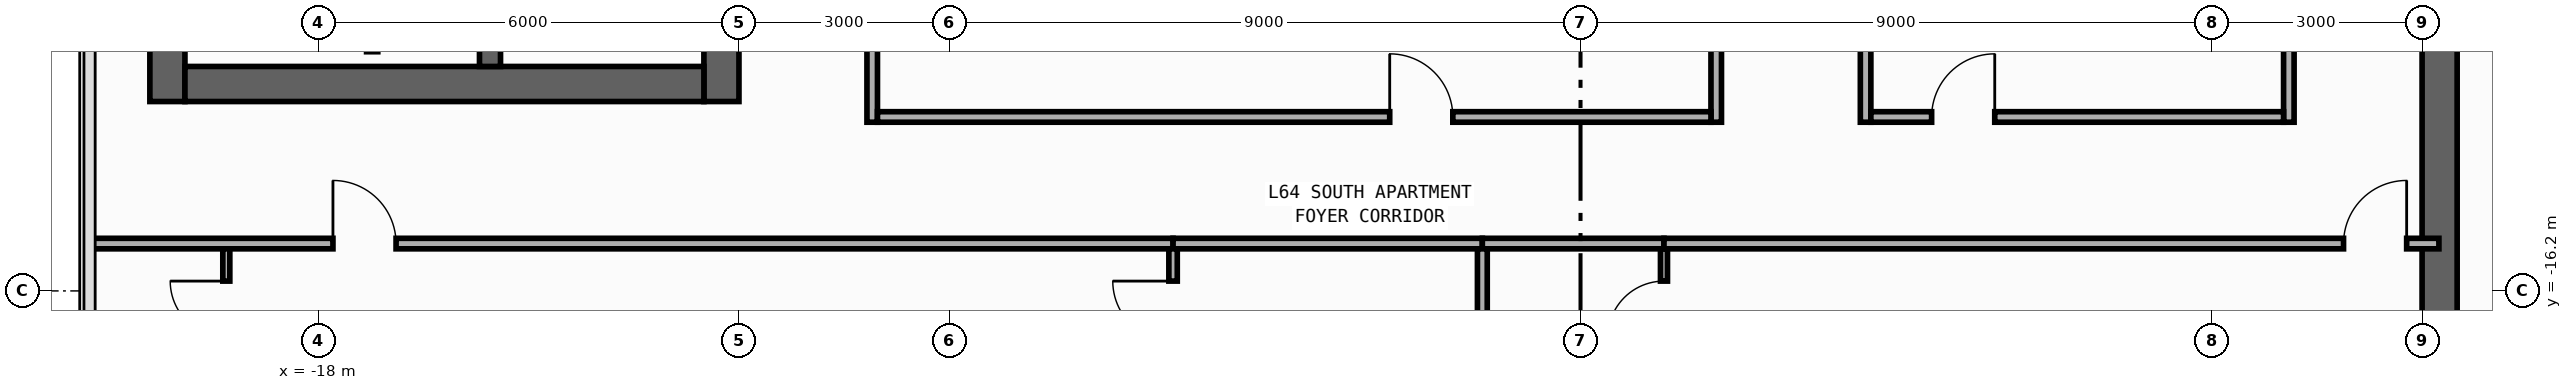
"""IFC4 building model, lengths in metres.
Left out: names, types, materials, properties, quantities, classifications, styles, units other than length and angle.
Written with IfcOpenShell. Run it as: python <this file> out.ifc"""

import sys

from ifc_helpers import new_model, si_unit, direction, frame, frame_2d, origin, place, context, subcontext, project, spatial, rectangle, extrude, element, fill, save


model = new_model("IFC4")
c1 = context("Model", 3, precision=1e-05, world=origin(), true_north=direction((0.0, 1.0)))
c2 = subcontext(c1, "Body", "Model", "MODEL_VIEW")
j1 = project(units=[si_unit("LENGTHUNIT", "METRE"), si_unit("PLANEANGLEUNIT", "RADIAN")], contexts=[c1])
p1 = place(None, origin())
s1 = spatial("IfcSite", under=j1, at=p1, CompositionType="ELEMENT")
p2 = place(p1, origin())
s2 = spatial("IfcBuilding", under=s1, at=p2, CompositionType="ELEMENT")
p3 = place(p2, frame((0.0, 0.0, 269.2)))
s3 = spatial("IfcBuildingStorey", under=s2, at=p3, CompositionType="ELEMENT", Elevation=269.2)
p4 = place(p3, frame((-20.15, -13.5, 0.0), z_axis=(0.0, 0.0, 1.0), x_axis=(0.0, 1.0, 0.0)))
e1 = element("IfcWall", 1, at=p4, inside=s3, PredefinedType="SHEAR", context=c2, shape_type="SweptSolid", body=[
    extrude(rectangle(XDim=27.0, YDim=0.5, at=frame_2d((13.5, 0.0))), origin(), (0.0, 0.0, 1.0), 3.25),
])
p5 = place(p3, frame((-12.25, -13.5, 0.0), z_axis=(0.0, 0.0, 1.0), x_axis=(0.0, 1.0, 0.0)))
e2 = element("IfcWall", 2, at=p5, inside=s3, PredefinedType="SHEAR", context=c2, shape_type="SweptSolid", body=[
    extrude(rectangle(XDim=27.0, YDim=0.5, at=frame_2d((13.5, 0.0))), origin(), (0.0, 0.0, 1.0), 3.25),
])
p6 = place(p5, frame((15.175, 0.0, 0.0)))
e3 = element("IfcOpeningElement", 3, at=p6, cuts=e2, PredefinedType="OPENING", context=c2, shape_type="SweptSolid", body=[
    extrude(rectangle(XDim=0.85, YDim=2.1, at=frame_2d((0.425, 1.05))), frame((0.0, 0.26, 0.0), z_axis=(0.0, -1.0, 0.0), x_axis=(1.0, 0.0, 0.0)), (0.0, 0.0, 1.0), 0.52),
])
p7 = place(p5, frame((21.275, 0.0, 0.0)))
e4 = element("IfcOpeningElement", 4, at=p7, cuts=e2, PredefinedType="OPENING", context=c2, shape_type="SweptSolid", body=[
    extrude(rectangle(XDim=0.85, YDim=2.1, at=frame_2d((0.425, 1.05))), frame((0.0, 0.26, 0.0), z_axis=(0.0, -1.0, 0.0), x_axis=(1.0, 0.0, 0.0)), (0.0, 0.0, 1.0), 0.52),
])
p8 = place(p5, frame((4.275, 0.0, 0.0)))
e5 = element("IfcOpeningElement", 5, at=p8, cuts=e2, PredefinedType="OPENING", context=c2, shape_type="SweptSolid", body=[
    extrude(rectangle(XDim=0.85, YDim=2.1, at=frame_2d((0.425, 1.05))), frame((0.0, 0.26, 0.0), z_axis=(0.0, -1.0, 0.0), x_axis=(1.0, 0.0, 0.0)), (0.0, 0.0, 1.0), 0.52),
])
p9 = place(p5, frame((10.275, 0.0, 0.0)))
e6 = element("IfcOpeningElement", 6, at=p9, cuts=e2, PredefinedType="OPENING", context=c2, shape_type="SweptSolid", body=[
    extrude(rectangle(XDim=0.85, YDim=2.1, at=frame_2d((0.425, 1.05))), frame((0.0, 0.26, 0.0), z_axis=(0.0, -1.0, 0.0), x_axis=(1.0, 0.0, 0.0)), (0.0, 0.0, 1.0), 0.52),
])
p10 = place(p5, frame((12.725, 0.0, 0.0)))
e7 = element("IfcOpeningElement", 7, at=p10, cuts=e2, PredefinedType="OPENING", context=c2, shape_type="SweptSolid", body=[
    extrude(rectangle(XDim=1.15, YDim=2.2, at=frame_2d((0.575, 1.1))), frame((0.0, 0.26, 0.0), z_axis=(0.0, -1.0, 0.0), x_axis=(1.0, 0.0, 0.0)), (0.0, 0.0, 1.0), 0.52),
])
p11 = place(p5, frame((1.625, 0.0, 0.0)))
e8 = element("IfcOpeningElement", 8, at=p11, cuts=e2, PredefinedType="OPENING", context=c2, shape_type="SweptSolid", body=[
    extrude(rectangle(XDim=0.85, YDim=2.1, at=frame_2d((0.425, 1.05))), frame((0.0, 0.26, 0.0), z_axis=(0.0, -1.0, 0.0), x_axis=(1.0, 0.0, 0.0)), (0.0, 0.0, 1.0), 0.52),
])
p12 = place(p3, frame((-19.9, -13.25, 0.0), z_axis=(0.0, 0.0, 1.0), x_axis=(1.0, 0.0, 0.0)))
e9 = element("IfcWall", 9, at=p12, inside=s3, PredefinedType="SHEAR", context=c2, shape_type="SweptSolid", body=[
    extrude(rectangle(XDim=7.4, YDim=0.5, at=frame_2d((3.7, 0.0))), origin(), (0.0, 0.0, 1.0), 3.25),
])
p13 = place(p3, frame((-15.55, -13.0, 0.0), z_axis=(0.0, 0.0, 1.0), x_axis=(0.0, 1.0, 0.0)))
e10 = element("IfcWall", 10, at=p13, inside=s3, PredefinedType="SHEAR", context=c2, shape_type="SweptSolid", body=[
    extrude(rectangle(XDim=26.0, YDim=0.3, at=frame_2d((13.0, 0.0))), origin(), (0.0, 0.0, 1.0), 3.25),
])
p14 = place(p13, frame((12.225, 0.0, 0.0)))
e11 = element("IfcOpeningElement", 11, at=p14, cuts=e10, PredefinedType="OPENING", context=c2, shape_type="SweptSolid", body=[
    extrude(rectangle(XDim=1.15, YDim=2.2, at=frame_2d((0.575, 1.1))), frame((0.0, 0.16, 0.0), z_axis=(0.0, -1.0, 0.0), x_axis=(1.0, 0.0, 0.0)), (0.0, 0.0, 1.0), 0.32),
])
p15 = place(p13, frame((1.125, 0.0, 0.0)))
e12 = element("IfcOpeningElement", 12, at=p15, cuts=e10, PredefinedType="OPENING", context=c2, shape_type="SweptSolid", body=[
    extrude(rectangle(XDim=0.85, YDim=2.1, at=frame_2d((0.425, 1.05))), frame((0.0, 0.16, 0.0), z_axis=(0.0, -1.0, 0.0), x_axis=(1.0, 0.0, 0.0)), (0.0, 0.0, 1.0), 0.32),
])
p16 = place(p3, frame((12.25, -19.8, 0.0), z_axis=(0.0, 0.0, 1.0), x_axis=(0.0, 1.0, 0.0)))
e13 = element("IfcWall", 13, at=p16, inside=s3, PredefinedType="SHEAR", context=c2, shape_type="SweptSolid", body=[
    extrude(rectangle(XDim=27.0, YDim=0.5, at=frame_2d((13.5, 0.0))), origin(), (0.0, 0.0, 1.0), 3.25),
])
p17 = place(p16, frame((23.05, 0.0, 0.0)))
e14 = element("IfcOpeningElement", 14, at=p17, cuts=e13, PredefinedType="OPENING", context=c2, shape_type="SweptSolid", body=[
    extrude(rectangle(XDim=1.1, YDim=2.2, at=frame_2d((0.55, 1.1))), frame((0.0, 0.26, 0.0), z_axis=(0.0, -1.0, 0.0), x_axis=(1.0, 0.0, 0.0)), (0.0, 0.0, 1.0), 0.52),
])
p18 = place(p16, frame((19.85, 0.0, 0.0)))
e15 = element("IfcOpeningElement", 15, at=p18, cuts=e13, PredefinedType="OPENING", context=c2, shape_type="SweptSolid", body=[
    extrude(rectangle(XDim=1.1, YDim=2.2, at=frame_2d((0.55, 1.1))), frame((0.0, 0.26, 0.0), z_axis=(0.0, -1.0, 0.0), x_axis=(1.0, 0.0, 0.0)), (0.0, 0.0, 1.0), 0.52),
])
p19 = place(p16, frame((16.65, 0.0, 0.0)))
e16 = element("IfcOpeningElement", 16, at=p19, cuts=e13, PredefinedType="OPENING", context=c2, shape_type="SweptSolid", body=[
    extrude(rectangle(XDim=1.1, YDim=2.2, at=frame_2d((0.55, 1.1))), frame((0.0, 0.26, 0.0), z_axis=(0.0, -1.0, 0.0), x_axis=(1.0, 0.0, 0.0)), (0.0, 0.0, 1.0), 0.52),
])
p20 = place(p16, frame((7.175, 0.0, 0.0)))
e17 = element("IfcOpeningElement", 17, at=p20, cuts=e13, PredefinedType="OPENING", context=c2, shape_type="SweptSolid", body=[
    extrude(rectangle(XDim=0.85, YDim=2.1, at=frame_2d((0.425, 1.05))), frame((0.0, 0.26, 0.0), z_axis=(0.0, -1.0, 0.0), x_axis=(1.0, 0.0, 0.0)), (0.0, 0.0, 1.0), 0.52),
])
p21 = place(p16, frame((10.375, 0.0, 0.0)))
e18 = element("IfcOpeningElement", 18, at=p21, cuts=e13, PredefinedType="OPENING", context=c2, shape_type="SweptSolid", body=[
    extrude(rectangle(XDim=0.85, YDim=2.1, at=frame_2d((0.425, 1.05))), frame((0.0, 0.26, 0.0), z_axis=(0.0, -1.0, 0.0), x_axis=(1.0, 0.0, 0.0)), (0.0, 0.0, 1.0), 0.52),
])
p22 = place(p16, frame((12.725, 0.0, 0.0)))
e19 = element("IfcOpeningElement", 19, at=p22, cuts=e13, PredefinedType="OPENING", context=c2, shape_type="SweptSolid", body=[
    extrude(rectangle(XDim=1.15, YDim=2.2, at=frame_2d((0.575, 1.1))), frame((0.0, 0.26, 0.0), z_axis=(0.0, -1.0, 0.0), x_axis=(1.0, 0.0, 0.0)), (0.0, 0.0, 1.0), 0.52),
])
p23 = place(p16, frame((25.125, 0.0, 0.0)))
e20 = element("IfcOpeningElement", 20, at=p23, cuts=e13, PredefinedType="OPENING", context=c2, shape_type="SweptSolid", body=[
    extrude(rectangle(XDim=0.85, YDim=2.1, at=frame_2d((0.425, 1.05))), frame((0.0, 0.26, 0.0), z_axis=(0.0, -1.0, 0.0), x_axis=(1.0, 0.0, 0.0)), (0.0, 0.0, 1.0), 0.52),
])
p24 = place(p3, frame((-10.1, -13.795, 0.0), z_axis=(0.0, 0.0, 1.0), x_axis=(0.0, 1.0, 0.0)))
e21 = element("IfcWall", 21, at=p24, inside=s3, PredefinedType="PARTITIONING", context=c2, shape_type="SweptSolid", body=[
    extrude(rectangle(XDim=15.605, YDim=0.15, at=frame_2d((7.802, 0.0))), origin(), (0.0, 0.0, 1.0), 3.25),
])
p25 = place(p24, frame((7.961, 0.0, 0.0)))
e22 = element("IfcOpeningElement", 22, at=p25, cuts=e21, PredefinedType="OPENING", context=c2, shape_type="SweptSolid", body=[
    extrude(rectangle(XDim=0.9, YDim=2.15, at=frame_2d((0.45, 1.075))), frame((0.0, 0.085, 0.0), z_axis=(0.0, -1.0, 0.0), x_axis=(1.0, 0.0, 0.0)), (0.0, 0.0, 1.0), 0.17),
])
p26 = place(p3, frame((10.1, -13.795, 0.0), z_axis=(0.0, 0.0, 1.0), x_axis=(0.0, 1.0, 0.0)))
e23 = element("IfcWall", 23, at=p26, inside=s3, PredefinedType="PARTITIONING", context=c2, shape_type="SweptSolid", body=[
    extrude(rectangle(XDim=12.975, YDim=0.15, at=frame_2d((6.487, 0.0))), origin(), (0.0, 0.0, 1.0), 3.25),
])
p27 = place(p26, frame((7.964, 0.0, 0.0)))
e24 = element("IfcOpeningElement", 24, at=p27, cuts=e23, PredefinedType="OPENING", context=c2, shape_type="SweptSolid", body=[
    extrude(rectangle(XDim=0.9, YDim=2.15, at=frame_2d((0.45, 1.075))), frame((0.0, 0.085, 0.0), z_axis=(0.0, -1.0, 0.0), x_axis=(1.0, 0.0, 0.0)), (0.0, 0.0, 1.0), 0.17),
])
p28 = place(p3, frame((1.935, -13.795, 0.0), z_axis=(0.0, 0.0, 1.0), x_axis=(0.0, 1.0, 0.0)))
e25 = element("IfcWall", 25, at=p28, inside=s3, PredefinedType="PARTITIONING", context=c2, shape_type="SweptSolid", body=[
    extrude(rectangle(XDim=15.455, YDim=0.15, at=frame_2d((7.728, 0.0))), origin(), (0.0, 0.0, 1.0), 3.25),
])
p29 = place(p28, frame((7.879, 0.0, 0.0)))
e26 = element("IfcOpeningElement", 26, at=p29, cuts=e25, PredefinedType="OPENING", context=c2, shape_type="SweptSolid", body=[
    extrude(rectangle(XDim=0.9, YDim=2.15, at=frame_2d((0.45, 1.075))), frame((0.0, 0.085, 0.0), z_axis=(0.0, -1.0, 0.0), x_axis=(1.0, 0.0, 0.0)), (0.0, 0.0, 1.0), 0.17),
])
p30 = place(p3, frame((4.065, -13.795, 0.0), z_axis=(0.0, 0.0, 1.0), x_axis=(0.0, 1.0, 0.0)))
e27 = element("IfcWall", 27, at=p30, inside=s3, PredefinedType="PARTITIONING", context=c2, shape_type="SweptSolid", body=[
    extrude(rectangle(XDim=12.815, YDim=0.15, at=frame_2d((6.407, 0.0))), origin(), (0.0, 0.0, 1.0), 3.25),
])
p31 = place(p30, frame((7.994, 0.0, 0.0)))
e28 = element("IfcOpeningElement", 28, at=p31, cuts=e27, PredefinedType="OPENING", context=c2, shape_type="SweptSolid", body=[
    extrude(rectangle(XDim=0.9, YDim=2.15, at=frame_2d((0.45, 1.075))), frame((0.0, 0.085, 0.0), z_axis=(0.0, -1.0, 0.0), x_axis=(1.0, 0.0, 0.0)), (0.0, 0.0, 1.0), 0.17),
])
p32 = place(p3, frame((-21.255, -15.525, 0.0), z_axis=(0.0, 0.0, 1.0), x_axis=(1.0, 0.0, 0.0)))
e29 = element("IfcWall", 29, at=p32, inside=s3, PredefinedType="PARTITIONING", context=c2, shape_type="SweptSolid", body=[
    extrude(rectangle(XDim=15.445, YDim=0.15, at=frame_2d((7.722, 0.0))), origin(), (0.0, 0.0, 1.0), 3.25),
])
p33 = place(p32, frame((3.466, 0.0, 0.0)))
e30 = element("IfcOpeningElement", 30, at=p33, cuts=e29, PredefinedType="OPENING", context=c2, shape_type="SweptSolid", body=[
    extrude(rectangle(XDim=0.9, YDim=2.15, at=frame_2d((0.45, 1.075))), frame((0.0, 0.085, 0.0), z_axis=(0.0, -1.0, 0.0), x_axis=(1.0, 0.0, 0.0)), (0.0, 0.0, 1.0), 0.17),
])
p34 = place(p3, frame((-5.81, -15.525, 0.0), z_axis=(0.0, 0.0, 1.0), x_axis=(1.0, 0.0, 0.0)))
e31 = element("IfcWall", 31, at=p34, inside=s3, PredefinedType="PARTITIONING", context=c2, shape_type="SweptSolid", body=[
    extrude(rectangle(XDim=4.41, YDim=0.15, at=frame_2d((2.205, 0.0))), origin(), (0.0, 0.0, 1.0), 3.25),
])
p35 = place(p3, frame((-1.4, -15.525, 0.0), z_axis=(0.0, 0.0, 1.0), x_axis=(1.0, 0.0, 0.0)))
e32 = element("IfcWall", 32, at=p35, inside=s3, PredefinedType="PARTITIONING", context=c2, shape_type="SweptSolid", body=[
    extrude(rectangle(XDim=2.59, YDim=0.15, at=frame_2d((1.295, 0.0))), origin(), (0.0, 0.0, 1.0), 3.25),
])
p36 = place(p3, frame((1.19, -15.525, 0.0), z_axis=(0.0, 0.0, 1.0), x_axis=(1.0, 0.0, 0.0)))
e33 = element("IfcWall", 33, at=p36, inside=s3, PredefinedType="PARTITIONING", context=c2, shape_type="SweptSolid", body=[
    extrude(rectangle(XDim=11.05, YDim=0.15, at=frame_2d((5.525, 0.0))), origin(), (0.0, 0.0, 1.0), 3.25),
])
p37 = place(p36, frame((9.69, 0.0, 0.0)))
e34 = element("IfcOpeningElement", 34, at=p37, cuts=e33, PredefinedType="OPENING", context=c2, shape_type="SweptSolid", body=[
    extrude(rectangle(XDim=0.9, YDim=2.15, at=frame_2d((0.45, 1.075))), frame((0.0, 0.085, 0.0), z_axis=(0.0, -1.0, 0.0), x_axis=(1.0, 0.0, 0.0)), (0.0, 0.0, 1.0), 0.17),
])
p38 = place(p3, frame((-10.025, -13.72, 0.0), z_axis=(0.0, 0.0, 1.0), x_axis=(1.0, 0.0, 0.0)))
e35 = element("IfcWall", 35, at=p38, inside=s3, PredefinedType="PARTITIONING", context=c2, shape_type="SweptSolid", body=[
    extrude(rectangle(XDim=11.885, YDim=0.15, at=frame_2d((5.942, 0.0))), origin(), (0.0, 0.0, 1.0), 3.25),
])
p39 = place(p38, frame((7.304, 0.0, 0.0)))
e36 = element("IfcOpeningElement", 36, at=p39, cuts=e35, PredefinedType="OPENING", context=c2, shape_type="SweptSolid", body=[
    extrude(rectangle(XDim=0.9, YDim=2.15, at=frame_2d((0.45, 1.075))), frame((0.0, 0.085, 0.0), z_axis=(0.0, -1.0, 0.0), x_axis=(1.0, 0.0, 0.0)), (0.0, 0.0, 1.0), 0.17),
])
p40 = place(p3, frame((4.14, -13.72, 0.0), z_axis=(0.0, 0.0, 1.0), x_axis=(1.0, 0.0, 0.0)))
e37 = element("IfcWall", 37, at=p40, inside=s3, PredefinedType="PARTITIONING", context=c2, shape_type="SweptSolid", body=[
    extrude(rectangle(XDim=5.885, YDim=0.15, at=frame_2d((2.942, 0.0))), origin(), (0.0, 0.0, 1.0), 3.25),
])
p41 = place(p40, frame((0.866, 0.0, 0.0)))
e38 = element("IfcOpeningElement", 38, at=p41, cuts=e37, PredefinedType="OPENING", context=c2, shape_type="SweptSolid", body=[
    extrude(rectangle(XDim=0.9, YDim=2.15, at=frame_2d((0.45, 1.075))), frame((0.0, 0.085, 0.0), z_axis=(0.0, -1.0, 0.0), x_axis=(1.0, 0.0, 0.0)), (0.0, 0.0, 1.0), 0.17),
])
p42 = place(p3, frame((-19.31, -18.1, 0.0), z_axis=(0.0, 0.0, 1.0), x_axis=(0.0, 1.0, 0.0)))
e39 = element("IfcWall", 39, at=p42, inside=s3, PredefinedType="PARTITIONING", context=c2, shape_type="SweptSolid", body=[
    extrude(rectangle(XDim=2.5, YDim=0.1, at=frame_2d((1.25, 0.0))), origin(), (0.0, 0.0, 1.0), 3.25),
])
p43 = place(p42, frame((1.24, 0.0, 0.0)))
e40 = element("IfcOpeningElement", 40, at=p43, cuts=e39, PredefinedType="OPENING", context=c2, shape_type="SweptSolid", body=[
    extrude(rectangle(XDim=0.8, YDim=2.1, at=frame_2d((0.4, 1.05))), frame((0.0, 0.06, 0.0), z_axis=(0.0, -1.0, 0.0), x_axis=(1.0, 0.0, 0.0)), (0.0, 0.0, 1.0), 0.12),
])
p44 = place(p3, frame((-5.81, -20.1, 0.0), z_axis=(0.0, 0.0, 1.0), x_axis=(0.0, 1.0, 0.0)))
e41 = element("IfcWall", 41, at=p44, inside=s3, PredefinedType="PARTITIONING", context=c2, shape_type="SweptSolid", body=[
    extrude(rectangle(XDim=4.5, YDim=0.12, at=frame_2d((2.25, 0.0))), origin(), (0.0, 0.0, 1.0), 3.25),
])
p45 = place(p44, frame((3.18, 0.0, 0.0)))
e42 = element("IfcOpeningElement", 42, at=p45, cuts=e41, PredefinedType="OPENING", context=c2, shape_type="SweptSolid", body=[
    extrude(rectangle(XDim=0.86, YDim=2.15, at=frame_2d((0.43, 1.075))), frame((0.0, 0.07, 0.0), z_axis=(0.0, -1.0, 0.0), x_axis=(1.0, 0.0, 0.0)), (0.0, 0.0, 1.0), 0.14),
])
p46 = place(p3, frame((-1.4, -18.1, 0.0), z_axis=(0.0, 0.0, 1.0), x_axis=(0.0, 1.0, 0.0)))
e43 = element("IfcWall", 43, at=p46, inside=s3, PredefinedType="PARTITIONING", context=c2, shape_type="SweptSolid", body=[
    extrude(rectangle(XDim=2.5, YDim=0.14, at=frame_2d((1.25, 0.0))), origin(), (0.0, 0.0, 1.0), 3.25),
])
p47 = place(p3, frame((1.19, -18.1, 0.0), z_axis=(0.0, 0.0, 1.0), x_axis=(0.0, 1.0, 0.0)))
e44 = element("IfcWall", 44, at=p47, inside=s3, PredefinedType="PARTITIONING", context=c2, shape_type="SweptSolid", body=[
    extrude(rectangle(XDim=2.5, YDim=0.1, at=frame_2d((1.25, 0.0))), origin(), (0.0, 0.0, 1.0), 3.25),
])
p48 = place(p47, frame((1.24, 0.0, 0.0)))
e45 = element("IfcOpeningElement", 45, at=p48, cuts=e44, PredefinedType="OPENING", context=c2, shape_type="SweptSolid", body=[
    extrude(rectangle(XDim=0.8, YDim=2.1, at=frame_2d((0.4, 1.05))), frame((0.0, 0.06, 0.0), z_axis=(0.0, -1.0, 0.0), x_axis=(1.0, 0.0, 0.0)), (0.0, 0.0, 1.0), 0.12),
])
p49 = place(p33, origin())
e46 = element("IfcDoor", 46, at=p49, inside=s3, OperationType="SINGLE_SWING_LEFT", PredefinedType="DOOR", context=c2, shape_type="SweptSolid", body=[
    extrude(rectangle(XDim=0.9, YDim=2.15, at=frame_2d((0.45, 1.075))), frame((0.0, 0.025, 0.0), z_axis=(0.0, -1.0, 0.0), x_axis=(1.0, 0.0, 0.0)), (0.0, 0.0, 1.0), 0.05),
])
fill(e30, e46)
p50 = place(p37, origin())
e47 = element("IfcDoor", 47, at=p50, inside=s3, OperationType="SINGLE_SWING_RIGHT", PredefinedType="DOOR", context=c2, shape_type="SweptSolid", body=[
    extrude(rectangle(XDim=0.9, YDim=2.15, at=frame_2d((0.45, 1.075))), frame((0.0, 0.025, 0.0), z_axis=(0.0, -1.0, 0.0), x_axis=(1.0, 0.0, 0.0)), (0.0, 0.0, 1.0), 0.05),
])
fill(e34, e47)
p51 = place(p39, origin())
e48 = element("IfcDoor", 48, at=p51, inside=s3, OperationType="SINGLE_SWING_LEFT", PredefinedType="DOOR", context=c2, shape_type="SweptSolid", body=[
    extrude(rectangle(XDim=0.9, YDim=2.15, at=frame_2d((0.45, 1.075))), frame((0.0, 0.025, 0.0), z_axis=(0.0, -1.0, 0.0), x_axis=(1.0, 0.0, 0.0)), (0.0, 0.0, 1.0), 0.05),
])
fill(e36, e48)
p52 = place(p41, origin())
e49 = element("IfcDoor", 49, at=p52, inside=s3, OperationType="SINGLE_SWING_RIGHT", PredefinedType="DOOR", context=c2, shape_type="SweptSolid", body=[
    extrude(rectangle(XDim=0.9, YDim=2.15, at=frame_2d((0.45, 1.075))), frame((0.0, 0.025, 0.0), z_axis=(0.0, -1.0, 0.0), x_axis=(1.0, 0.0, 0.0)), (0.0, 0.0, 1.0), 0.05),
])
fill(e38, e49)
p53 = place(p43, origin())
e50 = element("IfcDoor", 50, at=p53, inside=s3, OperationType="SINGLE_SWING_RIGHT", PredefinedType="DOOR", context=c2, shape_type="SweptSolid", body=[
    extrude(rectangle(XDim=0.8, YDim=2.1, at=frame_2d((0.4, 1.05))), frame((0.0, 0.025, 0.0), z_axis=(0.0, -1.0, 0.0), x_axis=(1.0, 0.0, 0.0)), (0.0, 0.0, 1.0), 0.05),
])
fill(e40, e50)
p54 = place(p45, origin())
e51 = element("IfcDoor", 51, at=p54, inside=s3, OperationType="SINGLE_SWING_RIGHT", PredefinedType="DOOR", context=c2, shape_type="SweptSolid", body=[
    extrude(rectangle(XDim=0.86, YDim=2.15, at=frame_2d((0.43, 1.075))), frame((0.0, 0.025, 0.0), z_axis=(0.0, -1.0, 0.0), x_axis=(1.0, 0.0, 0.0)), (0.0, 0.0, 1.0), 0.05),
])
fill(e42, e51)
p55 = place(p48, origin())
e52 = element("IfcDoor", 52, at=p55, inside=s3, OperationType="SINGLE_SWING_LEFT", PredefinedType="DOOR", context=c2, shape_type="SweptSolid", body=[
    extrude(rectangle(XDim=0.8, YDim=2.1, at=frame_2d((0.4, 1.05))), frame((0.0, 0.025, 0.0), z_axis=(0.0, -1.0, 0.0), x_axis=(1.0, 0.0, 0.0)), (0.0, 0.0, 1.0), 0.05),
])
fill(e45, e52)
save(model, sys.argv[1])
